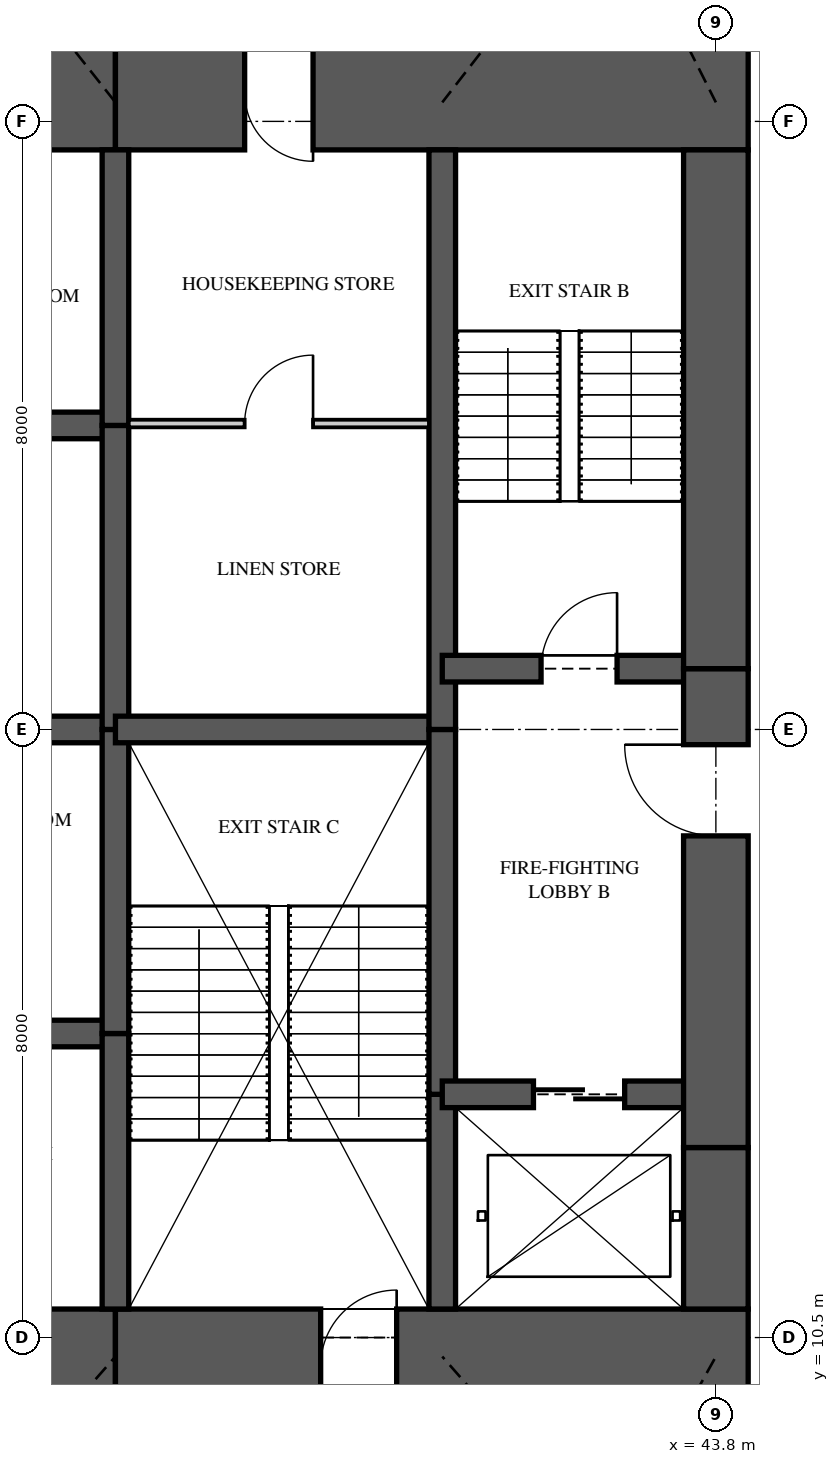
"""IFC4 building model, lengths in metres.
Left out: names, types, materials, properties, quantities, classifications, styles, units other than length and angle.
Written with IfcOpenShell. Run it as: python <this file> out.ifc"""

import sys

from ifc_helpers import new_model, si_unit, direction, frame, frame_2d, origin, place, context, subcontext, project, spatial, rectangle, extrude, element, fill, save


model = new_model("IFC4")
c1 = context("Model", 3, precision=1e-05, world=origin(), true_north=direction((0.0, 1.0)))
c2 = subcontext(c1, "Body", "Model", "MODEL_VIEW")
j1 = project(units=[si_unit("LENGTHUNIT", "METRE"), si_unit("PLANEANGLEUNIT", "RADIAN")], contexts=[c1])
p1 = place(None, origin())
s1 = spatial("IfcSite", under=j1, at=p1, CompositionType="ELEMENT")
p2 = place(p1, origin())
s2 = spatial("IfcBuilding", under=s1, at=p2, CompositionType="ELEMENT")
p3 = place(p2, frame((0.0, 0.0, 138.35)))
s3 = spatial("IfcBuildingStorey", under=s2, at=p3, CompositionType="ELEMENT", Elevation=138.35)
p4 = place(p3, frame((31.6, 10.125, 0.0), z_axis=(0.0, 0.0, 1.0), x_axis=(1.0, 0.0, 0.0)))
e1 = element("IfcWall", 1, at=p4, inside=s3, PredefinedType="SHEAR", context=c2, shape_type="SweptSolid", body=[
    extrude(rectangle(XDim=4.3, YDim=1.5, at=frame_2d((2.15, 0.0))), origin(), (0.0, 0.0, 1.0), 6.0),
])
p5 = place(p3, frame((35.9, 10.125, 0.0), z_axis=(0.0, 0.0, 1.0), x_axis=(1.0, 0.0, 0.0)))
e2 = element("IfcWall", 2, at=p5, inside=s3, PredefinedType="SHEAR", context=c2, shape_type="SweptSolid", body=[
    extrude(rectangle(XDim=8.325, YDim=1.5, at=frame_2d((4.163, 0.0))), origin(), (0.0, 0.0, 1.0), 6.0),
])
p6 = place(p5, frame((2.7, 0.0, 0.0)))
e3 = element("IfcOpeningElement", 3, at=p6, cuts=e2, PredefinedType="OPENING", context=c2, shape_type="SweptSolid", body=[
    extrude(rectangle(XDim=1.0, YDim=2.1, at=frame_2d((0.5, 1.05))), frame((0.0, 0.76, 0.0), z_axis=(0.0, -1.0, 0.0), x_axis=(1.0, 0.0, 0.0)), (0.0, 0.0, 1.0), 1.52),
])
p7 = place(p3, frame((44.225, 26.875, 0.0), z_axis=(0.0, 0.0, 1.0), x_axis=(-1.0, 0.0, 0.0)))
e4 = element("IfcWall", 4, at=p7, inside=s3, PredefinedType="SHEAR", context=c2, shape_type="SweptSolid", body=[
    extrude(rectangle(XDim=8.325, YDim=1.5, at=frame_2d((4.163, 0.0))), origin(), (0.0, 0.0, 1.0), 6.0),
])
p8 = place(p7, frame((5.725, 0.0, 0.0)))
e5 = element("IfcOpeningElement", 5, at=p8, cuts=e4, PredefinedType="OPENING", context=c2, shape_type="SweptSolid", body=[
    extrude(rectangle(XDim=0.9, YDim=2.1, at=frame_2d((0.45, 1.05))), frame((0.0, 0.76, 0.0), z_axis=(0.0, -1.0, 0.0), x_axis=(1.0, 0.0, 0.0)), (0.0, 0.0, 1.0), 1.52),
])
p9 = place(p3, frame((35.9, 26.875, 0.0), z_axis=(0.0, 0.0, 1.0), x_axis=(-1.0, 0.0, 0.0)))
e6 = element("IfcWall", 6, at=p9, inside=s3, PredefinedType="SHEAR", context=c2, shape_type="SweptSolid", body=[
    extrude(rectangle(XDim=4.3, YDim=1.5, at=frame_2d((2.15, 0.0))), origin(), (0.0, 0.0, 1.0), 6.0),
])
p10 = place(p3, frame((43.8, 10.875, 0.0), z_axis=(0.0, 0.0, 1.0), x_axis=(0.0, 1.0, 0.0)))
e7 = element("IfcWall", 7, at=p10, inside=s3, PredefinedType="SHEAR", context=c2, shape_type="SweptSolid", body=[
    extrude(rectangle(XDim=2.125, YDim=0.85, at=frame_2d((1.062, 0.0))), origin(), (0.0, 0.0, 1.0), 6.0),
])
p11 = place(p3, frame((43.8, 13.0, 0.0), z_axis=(0.0, 0.0, 1.0), x_axis=(0.0, 1.0, 0.0)))
e8 = element("IfcWall", 8, at=p11, inside=s3, PredefinedType="SHEAR", context=c2, shape_type="SweptSolid", body=[
    extrude(rectangle(XDim=6.3, YDim=0.85, at=frame_2d((3.15, 0.0))), origin(), (0.0, 0.0, 1.0), 6.0),
])
p12 = place(p11, frame((4.1, 0.0, 0.0)))
e9 = element("IfcOpeningElement", 9, at=p12, cuts=e8, PredefinedType="OPENING", context=c2, shape_type="SweptSolid", body=[
    extrude(rectangle(XDim=1.2, YDim=2.2, at=frame_2d((0.6, 1.1))), frame((0.0, 0.435, 0.0), z_axis=(0.0, -1.0, 0.0), x_axis=(1.0, 0.0, 0.0)), (0.0, 0.0, 1.0), 0.87),
])
p13 = place(p3, frame((43.8, 19.3, 0.0), z_axis=(0.0, 0.0, 1.0), x_axis=(0.0, 1.0, 0.0)))
e10 = element("IfcWall", 10, at=p13, inside=s3, PredefinedType="SHEAR", context=c2, shape_type="SweptSolid", body=[
    extrude(rectangle(XDim=6.825, YDim=0.85, at=frame_2d((3.413, 0.0))), origin(), (0.0, 0.0, 1.0), 6.0),
])
p14 = place(p3, frame((35.9, 10.875, 0.0), z_axis=(0.0, 0.0, 1.0), x_axis=(0.0, 1.0, 0.0)))
e11 = element("IfcWall", 11, at=p14, inside=s3, PredefinedType="SHEAR", context=c2, shape_type="SweptSolid", body=[
    extrude(rectangle(XDim=3.625, YDim=0.35, at=frame_2d((1.812, 0.0))), origin(), (0.0, 0.0, 1.0), 6.0),
])
for number, where, z_axis, x_axis in (
    (12, (35.9, 14.5, 0.0), (0.0, 0.0, 1.0), (0.0, 1.0, 0.0)),
    (13, (35.9, 18.5, 0.0), (0.0, 0.0, 1.0), (0.0, 1.0, 0.0)),
):
    element("IfcWall", number, at=place(p3, frame(where, z_axis=z_axis, x_axis=x_axis)), inside=s3, PredefinedType="SHEAR", context=c2, shape_type="SweptSolid", body=[
        extrude(rectangle(XDim=4.0, YDim=0.35, at=frame_2d((2.0, 0.0))), origin(), (0.0, 0.0, 1.0), 6.0),
    ])
p15 = place(p3, frame((35.9, 22.5, 0.0), z_axis=(0.0, 0.0, 1.0), x_axis=(0.0, 1.0, 0.0)))
e14 = element("IfcWall", 14, at=p15, inside=s3, PredefinedType="SHEAR", context=c2, shape_type="SweptSolid", body=[
    extrude(rectangle(XDim=3.625, YDim=0.35, at=frame_2d((1.812, 0.0))), origin(), (0.0, 0.0, 1.0), 6.0),
])
p16 = place(p3, frame((40.2, 10.875, 0.0), z_axis=(0.0, 0.0, 1.0), x_axis=(0.0, 1.0, 0.0)))
e15 = element("IfcWall", 15, at=p16, inside=s3, PredefinedType="SHEAR", context=c2, shape_type="SweptSolid", body=[
    extrude(rectangle(XDim=2.825, YDim=0.35, at=frame_2d((1.413, 0.0))), origin(), (0.0, 0.0, 1.0), 6.0),
])
p17 = place(p3, frame((40.2, 13.7, 0.0), z_axis=(0.0, 0.0, 1.0), x_axis=(0.0, 1.0, 0.0)))
e16 = element("IfcWall", 16, at=p17, inside=s3, PredefinedType="SHEAR", context=c2, shape_type="SweptSolid", body=[
    extrude(rectangle(XDim=4.8, YDim=0.35, at=frame_2d((2.4, 0.0))), origin(), (0.0, 0.0, 1.0), 6.0),
])
p18 = place(p3, frame((40.2, 18.5, 0.0), z_axis=(0.0, 0.0, 1.0), x_axis=(0.0, 1.0, 0.0)))
e17 = element("IfcWall", 17, at=p18, inside=s3, PredefinedType="SHEAR", context=c2, shape_type="SweptSolid", body=[
    extrude(rectangle(XDim=7.625, YDim=0.35, at=frame_2d((3.812, 0.0))), origin(), (0.0, 0.0, 1.0), 6.0),
])
for number, where, z_axis, x_axis in (
    (18, (31.6, 14.5, 0.0), (0.0, 0.0, 1.0), (1.0, 0.0, 0.0)),
    (19, (31.6, 18.5, 0.0), (0.0, 0.0, 1.0), (1.0, 0.0, 0.0)),
    (20, (31.6, 22.5, 0.0), (0.0, 0.0, 1.0), (1.0, 0.0, 0.0)),
):
    element("IfcWall", number, at=place(p3, frame(where, z_axis=z_axis, x_axis=x_axis)), inside=s3, PredefinedType="SHEAR", context=c2, shape_type="SweptSolid", body=[
        extrude(rectangle(XDim=4.3, YDim=0.35, at=frame_2d((2.15, 0.0))), origin(), (0.0, 0.0, 1.0), 6.0),
    ])
p19 = place(p3, frame((35.9, 18.5, 0.0), z_axis=(0.0, 0.0, 1.0), x_axis=(1.0, 0.0, 0.0)))
e21 = element("IfcWall", 21, at=p19, inside=s3, PredefinedType="SHEAR", context=c2, shape_type="SweptSolid", body=[
    extrude(rectangle(XDim=4.3, YDim=0.35, at=frame_2d((2.15, 0.0))), origin(), (0.0, 0.0, 1.0), 6.0),
])
p20 = place(p3, frame((40.2, 13.7, 0.0), z_axis=(0.0, 0.0, 1.0), x_axis=(1.0, 0.0, 0.0)))
e22 = element("IfcWall", 22, at=p20, inside=s3, PredefinedType="SHEAR", context=c2, shape_type="SweptSolid", body=[
    extrude(rectangle(XDim=3.6, YDim=0.35, at=frame_2d((1.8, 0.0))), origin(), (0.0, 0.0, 1.0), 6.0),
])
p21 = place(p20, frame((1.2, 0.0, 0.0)))
e23 = element("IfcOpeningElement", 23, at=p21, cuts=e22, PredefinedType="OPENING", context=c2, shape_type="SweptSolid", body=[
    extrude(rectangle(XDim=1.2, YDim=2.1, at=frame_2d((0.6, 1.05))), frame((0.0, 0.185, 0.0), z_axis=(0.0, -1.0, 0.0), x_axis=(1.0, 0.0, 0.0)), (0.0, 0.0, 1.0), 0.37),
])
p22 = place(p3, frame((40.2, 19.3, 0.0), z_axis=(0.0, 0.0, 1.0), x_axis=(1.0, 0.0, 0.0)))
e24 = element("IfcWall", 24, at=p22, inside=s3, PredefinedType="SHEAR", context=c2, shape_type="SweptSolid", body=[
    extrude(rectangle(XDim=3.6, YDim=0.35, at=frame_2d((1.8, 0.0))), origin(), (0.0, 0.0, 1.0), 6.0),
])
p23 = place(p22, frame((1.3, 0.0, 0.0)))
e25 = element("IfcOpeningElement", 25, at=p23, cuts=e24, PredefinedType="OPENING", context=c2, shape_type="SweptSolid", body=[
    extrude(rectangle(XDim=1.0, YDim=2.1, at=frame_2d((0.5, 1.05))), frame((0.0, 0.185, 0.0), z_axis=(0.0, -1.0, 0.0), x_axis=(1.0, 0.0, 0.0)), (0.0, 0.0, 1.0), 0.37),
])
p24 = place(p3, frame((36.075, 22.525, 0.0), z_axis=(0.0, 0.0, 1.0), x_axis=(1.0, 0.0, 0.0)))
e26 = element("IfcWall", 26, at=p24, inside=s3, PredefinedType="PARTITIONING", context=c2, shape_type="SweptSolid", body=[
    extrude(rectangle(XDim=3.95, YDim=0.1, at=frame_2d((1.975, 0.0))), origin(), (0.0, 0.0, 1.0), 5.72),
])
p25 = place(p24, frame((1.525, 0.0, 0.0)))
e27 = element("IfcOpeningElement", 27, at=p25, cuts=e26, PredefinedType="OPENING", context=c2, shape_type="SweptSolid", body=[
    extrude(rectangle(XDim=0.9, YDim=2.1, at=frame_2d((0.45, 1.05))), frame((0.0, 0.06, 0.0), z_axis=(0.0, -1.0, 0.0), x_axis=(1.0, 0.0, 0.0)), (0.0, 0.0, 1.0), 0.12),
])
p26 = place(p25, origin())
e28 = element("IfcDoor", 28, at=p26, inside=s3, OperationType="SINGLE_SWING_RIGHT", PredefinedType="DOOR", context=c2, shape_type="SweptSolid", body=[
    extrude(rectangle(XDim=0.9, YDim=2.1, at=frame_2d((0.45, 1.05))), frame((0.0, 0.025, 0.0), z_axis=(0.0, -1.0, 0.0), x_axis=(1.0, 0.0, 0.0)), (0.0, 0.0, 1.0), 0.05),
])
fill(e27, e28)
p27 = place(p23, origin())
e29 = element("IfcDoor", 29, at=p27, inside=s3, OperationType="SINGLE_SWING_RIGHT", PredefinedType="DOOR", context=c2, shape_type="SweptSolid", body=[
    extrude(rectangle(XDim=1.0, YDim=2.1, at=frame_2d((0.5, 1.05))), frame((0.0, 0.025, 0.0), z_axis=(0.0, -1.0, 0.0), x_axis=(1.0, 0.0, 0.0)), (0.0, 0.0, 1.0), 0.05),
])
fill(e25, e29)
p28 = place(p12, origin())
e30 = element("IfcDoor", 30, at=p28, inside=s3, OperationType="SINGLE_SWING_RIGHT", PredefinedType="DOOR", context=c2, shape_type="SweptSolid", body=[
    extrude(rectangle(XDim=1.2, YDim=2.2, at=frame_2d((0.6, 1.1))), frame((0.0, 0.025, 0.0), z_axis=(0.0, -1.0, 0.0), x_axis=(1.0, 0.0, 0.0)), (0.0, 0.0, 1.0), 0.05),
])
fill(e9, e30)
p29 = place(p21, origin())
e31 = element("IfcDoor", 31, at=p29, inside=s3, OperationType="SLIDING_TO_LEFT", PredefinedType="DOOR", context=c2, shape_type="SweptSolid", body=[
    extrude(rectangle(XDim=1.2, YDim=2.1, at=frame_2d((0.6, 1.05))), frame((0.0, 0.025, 0.0), z_axis=(0.0, -1.0, 0.0), x_axis=(1.0, 0.0, 0.0)), (0.0, 0.0, 1.0), 0.05),
])
fill(e23, e31)
p30 = place(p6, origin())
e32 = element("IfcDoor", 32, at=p30, inside=s3, OperationType="SINGLE_SWING_RIGHT", PredefinedType="DOOR", context=c2, shape_type="SweptSolid", body=[
    extrude(rectangle(XDim=1.0, YDim=2.1, at=frame_2d((0.5, 1.05))), frame((0.0, 0.025, 0.0), z_axis=(0.0, -1.0, 0.0), x_axis=(1.0, 0.0, 0.0)), (0.0, 0.0, 1.0), 0.05),
])
fill(e3, e32)
p31 = place(p8, origin())
e33 = element("IfcDoor", 33, at=p31, inside=s3, OperationType="SINGLE_SWING_LEFT", PredefinedType="DOOR", context=c2, shape_type="SweptSolid", body=[
    extrude(rectangle(XDim=0.9, YDim=2.1, at=frame_2d((0.45, 1.05))), frame((0.0, 0.47, 0.0), z_axis=(0.0, -1.0, 0.0), x_axis=(1.0, 0.0, 0.0)), (0.0, 0.0, 1.0), 0.8),
])
fill(e5, e33)
save(model, sys.argv[1])
